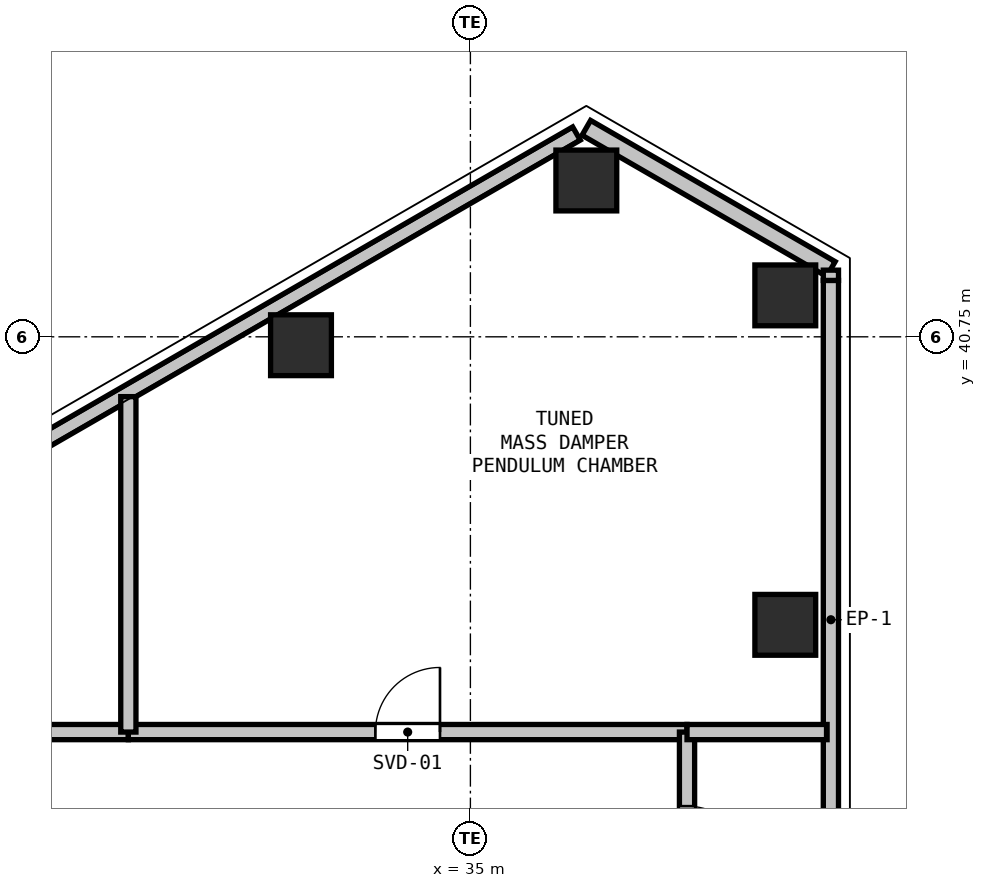
"""IFC4 building model, lengths in metres.
Left out: names, types, materials, properties, quantities, classifications, styles, units other than length and angle.
Written with IfcOpenShell. Run it as: python <this file> out.ifc"""

import sys

from ifc_helpers import new_model, si_unit, direction, frame, frame_2d, origin, origin_2d, place, context, subcontext, project, spatial, rectangle, hollow_rectangle, extrude, element, fill, save


model = new_model("IFC4")
c1 = context("Model", 3, precision=1e-05, world=origin(), true_north=direction((0.0, 1.0)))
c2 = subcontext(c1, "Body", "Model", "MODEL_VIEW")
j1 = project(units=[si_unit("LENGTHUNIT", "METRE"), si_unit("PLANEANGLEUNIT", "RADIAN")], contexts=[c1])
p1 = place(None, origin())
s1 = spatial("IfcSite", under=j1, at=p1, CompositionType="ELEMENT")
p2 = place(p1, origin())
s2 = spatial("IfcBuilding", under=s1, at=p2, CompositionType="ELEMENT")
p3 = place(p2, frame((0.0, 0.0, 258.6)))
s3 = spatial("IfcBuildingStorey", under=s2, at=p3, CompositionType="ELEMENT", Elevation=258.6)
for number, where, z_axis, x_axis in (
    (1, (32.771, 40.639, 0.0), (0.0, 0.0, 1.0), (1.0, 0.0, 0.0)),
    (2, (36.525, 42.807, 0.0), (0.0, 0.0, 1.0), (1.0, 0.0, 0.0)),
    (3, (39.143, 41.295, 0.0), (0.0, 0.0, 1.0), (1.0, 0.0, 0.0)),
    (4, (39.143, 36.961, 0.0), (0.0, 0.0, 1.0), (1.0, 0.0, 0.0)),
):
    element("IfcColumn", number, at=place(p3, frame(where, z_axis=z_axis, x_axis=x_axis)), inside=s3, PredefinedType="COLUMN", context=c2, shape_type="SweptSolid", body=[
        extrude(hollow_rectangle(XDim=0.8, YDim=0.8, WallThickness=0.025, at=origin_2d()), origin(), (0.0, 0.0, 1.0), 5.4),
    ])
p4 = place(p3, frame((36.525, 43.5, 0.0), z_axis=(0.0, 0.0, 1.0), x_axis=(0.866038962515, -0.499976514854, 0.0)))
e5 = element("IfcWall", 5, at=p4, inside=s3, PredefinedType="SOLIDWALL", context=c2, shape_type="SweptSolid", body=[
    extrude(rectangle(XDim=3.716, YDim=0.225, at=frame_2d((1.858, 0.0))), origin(), (0.0, 0.0, 1.0), 4.7),
])
for number, where, z_axis, x_axis in (
    (6, (28.664, 38.96, 0.0), (0.0, 0.0, 1.0), (0.866, 0.5, 0.0)),
    (7, (39.743, 41.492, 0.0), (0.0, 0.0, 1.0), (0.0, -1.0, 0.0)),
):
    element("IfcWall", number, at=place(p3, frame(where, z_axis=z_axis, x_axis=x_axis)), inside=s3, PredefinedType="PARAPET", context=c2, shape_type="SweptSolid", body=[
        extrude(rectangle(XDim=8.928, YDim=0.2, at=frame_2d((4.464, 0.0))), origin(), (0.0, 0.0, 1.0), 0.2),
    ])
p5 = place(p3, frame((24.8, 35.55, 0.0), z_axis=(0.0, 0.0, 1.0), x_axis=(1.0, 0.0, 0.0)))
e8 = element("IfcWall", 8, at=p5, inside=s3, PredefinedType="PARTITIONING", context=c2, shape_type="SweptSolid", body=[
    extrude(rectangle(XDim=5.7, YDim=0.2, at=frame_2d((2.85, 0.0))), origin(), (0.0, 0.0, 1.0), 5.08),
])
p6 = place(p5, frame((2.425, 0.0, 0.0)))
e9 = element("IfcOpeningElement", 9, at=p6, cuts=e8, PredefinedType="OPENING", context=c2, shape_type="SweptSolid", body=[
    extrude(rectangle(XDim=0.85, YDim=2.1, at=frame_2d((0.425, 1.05))), frame((0.0, 0.11, 0.0), z_axis=(0.0, -1.0, 0.0), x_axis=(1.0, 0.0, 0.0)), (0.0, 0.0, 1.0), 0.22),
])
p7 = place(p3, frame((30.5, 35.55, 0.0), z_axis=(0.0, 0.0, 1.0), x_axis=(1.0, 0.0, 0.0)))
e10 = element("IfcWall", 10, at=p7, inside=s3, PredefinedType="PARTITIONING", context=c2, shape_type="SweptSolid", body=[
    extrude(rectangle(XDim=7.35, YDim=0.2, at=frame_2d((3.675, 0.0))), origin(), (0.0, 0.0, 1.0), 4.528),
])
p8 = place(p7, frame((3.25, 0.0, 0.0)))
e11 = element("IfcOpeningElement", 11, at=p8, cuts=e10, PredefinedType="OPENING", context=c2, shape_type="SweptSolid", body=[
    extrude(rectangle(XDim=0.85, YDim=2.1, at=frame_2d((0.425, 1.05))), frame((0.0, 0.11, 0.0), z_axis=(0.0, -1.0, 0.0), x_axis=(1.0, 0.0, 0.0)), (0.0, 0.0, 1.0), 0.22),
])
p9 = place(p3, frame((37.85, 35.55, 0.0), z_axis=(0.0, 0.0, 1.0), x_axis=(0.0, -1.0, 0.0)))
e12 = element("IfcWall", 12, at=p9, inside=s3, PredefinedType="PARTITIONING", context=c2, shape_type="SweptSolid", body=[
    extrude(rectangle(XDim=2.8, YDim=0.2, at=frame_2d((1.4, 0.0))), origin(), (0.0, 0.0, 1.0), 4.528),
])
p10 = place(p9, frame((0.975, 0.0, 0.0)))
e13 = element("IfcOpeningElement", 13, at=p10, cuts=e12, PredefinedType="OPENING", context=c2, shape_type="SweptSolid", body=[
    extrude(rectangle(XDim=0.85, YDim=2.1, at=frame_2d((0.425, 1.05))), frame((0.0, 0.11, 0.0), z_axis=(0.0, -1.0, 0.0), x_axis=(1.0, 0.0, 0.0)), (0.0, 0.0, 1.0), 0.22),
])
p11 = place(p3, frame((39.693, 35.55, 0.0), z_axis=(0.0, 0.0, 1.0), x_axis=(-1.0, 0.0, 0.0)))
e14 = element("IfcWall", 14, at=p11, inside=s3, PredefinedType="PARTITIONING", context=c2, shape_type="SweptSolid", body=[
    extrude(rectangle(XDim=1.843, YDim=0.2, at=frame_2d((0.921, 0.0))), origin(), (0.0, 0.0, 1.0), 4.528),
])
p12 = place(p3, frame((30.5, 35.55, 0.0), z_axis=(0.0, 0.0, 1.0), x_axis=(0.0, 1.0, 0.0)))
e15 = element("IfcWall", 15, at=p12, inside=s3, PredefinedType="PARTITIONING", context=c2, shape_type="SweptSolid", body=[
    extrude(rectangle(XDim=4.413, YDim=0.2, at=frame_2d((2.207, 0.0))), origin(), (0.0, 0.0, 1.0), 4.805),
])
p13 = place(p3, frame((39.743, 41.627, 0.0), z_axis=(0.0, 0.0, 1.0), x_axis=(0.0, -1.0, 0.0)))
e16 = element("IfcWall", 16, at=p13, inside=s3, PredefinedType="PARTITIONING", context=c2, shape_type="SweptSolid", body=[
    extrude(rectangle(XDim=0.135, YDim=0.2, at=frame_2d((0.068, 0.0))), origin(), (0.0, 0.0, 1.0), 5.08),
])
p14 = place(p8, origin())
e17 = element("IfcDoor", 17, at=p14, inside=s3, OperationType="SINGLE_SWING_RIGHT", PredefinedType="DOOR", context=c2, shape_type="SweptSolid", body=[
    extrude(rectangle(XDim=0.85, YDim=2.1, at=frame_2d((0.425, 1.05))), frame((0.0, 0.025, 0.0), z_axis=(0.0, -1.0, 0.0), x_axis=(1.0, 0.0, 0.0)), (0.0, 0.0, 1.0), 0.05),
])
fill(e11, e17)
p15 = place(p10, origin())
e18 = element("IfcDoor", 18, at=p15, inside=s3, OperationType="SINGLE_SWING_RIGHT", PredefinedType="DOOR", context=c2, shape_type="SweptSolid", body=[
    extrude(rectangle(XDim=0.85, YDim=2.1, at=frame_2d((0.425, 1.05))), frame((0.0, 0.025, 0.0), z_axis=(0.0, -1.0, 0.0), x_axis=(1.0, 0.0, 0.0)), (0.0, 0.0, 1.0), 0.05),
])
fill(e13, e18)
save(model, sys.argv[1])
